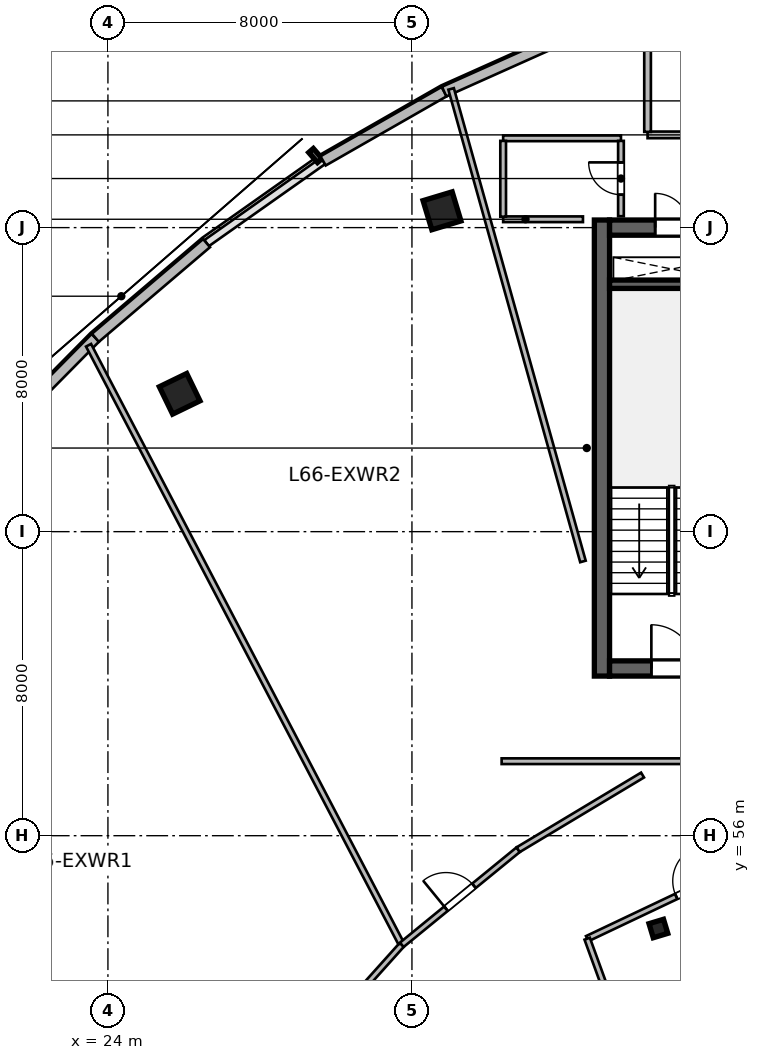
"""IFC4 building model, lengths in metres.
Left out: names, types, materials, properties, quantities, classifications, styles, units other than length and angle.
Written with IfcOpenShell. Run it as: python <this file> out.ifc"""

import sys

from ifc_helpers import new_model, si_unit, direction, frame, frame_2d, origin, origin_2d, place, context, subcontext, project, spatial, rectangle, i_section, extrude, source, transform, mapped, element, fill, save


model = new_model("IFC4")
c1 = context("Model", 3, precision=1e-05, world=origin(), true_north=direction((0.0, 1.0)))
c2 = subcontext(c1, "Body", "Model", "MODEL_VIEW")
j1 = project(units=[si_unit("LENGTHUNIT", "METRE"), si_unit("PLANEANGLEUNIT", "RADIAN")], contexts=[c1])
p1 = place(None, origin())
s1 = spatial("IfcSite", under=j1, at=p1, CompositionType="ELEMENT")
p2 = place(p1, origin())
s2 = spatial("IfcBuilding", under=s1, at=p2, CompositionType="ELEMENT")
p3 = place(p2, frame((0.0, 0.0, 271.8)))
s3 = spatial("IfcBuildingStorey", under=s2, at=p3, CompositionType="ELEMENT", Elevation=271.8)
m1 = source(origin(), c2, "Body", "SweptSolid", [
    extrude(rectangle(XDim=12.0, YDim=0.4, at=frame_2d((6.0, 0.0))), origin(), (0.0, 0.0, 1.0), 3.9),
])
p4 = place(p3, frame((37.0, 60.2, 0.0), z_axis=(0.0, 0.0, 1.0), x_axis=(0.0, 1.0, 0.0)))
e1 = element("IfcWall", 1, at=p4, inside=s3, PredefinedType="SHEAR", context=c2, shape_type="MappedRepresentation", body=[
    mapped(m1, transform((0.0, 0.0, 0.0), scale=1.0)),
])
m2 = source(origin(), c2, "Body", "SweptSolid", [
    extrude(rectangle(XDim=21.6, YDim=0.4, at=frame_2d((10.8, 0.0))), origin(), (0.0, 0.0, 1.0), 3.9),
])
p5 = place(p3, frame((37.2, 60.4, 0.0), z_axis=(0.0, 0.0, 1.0), x_axis=(1.0, 0.0, 0.0)))
e2 = element("IfcWall", 2, at=p5, inside=s3, PredefinedType="SHEAR", context=c2, shape_type="MappedRepresentation", body=[
    mapped(m2, transform((0.0, 0.0, 0.0), scale=1.0)),
])
p6 = place(p5, frame((1.1, 0.0, 0.0)))
e3 = element("IfcOpeningElement", 3, at=p6, cuts=e2, PredefinedType="OPENING", context=c2, shape_type="SweptSolid", body=[
    extrude(rectangle(XDim=1.15, YDim=2.15, at=frame_2d((0.575, 1.075))), frame((0.0, 0.21, 0.0), z_axis=(0.0, -1.0, 0.0), x_axis=(1.0, 0.0, 0.0)), (0.0, 0.0, 1.0), 0.42),
])
p7 = place(p5, frame((19.5, 0.0, 0.0)))
e4 = element("IfcOpeningElement", 4, at=p7, cuts=e2, PredefinedType="OPENING", context=c2, shape_type="SweptSolid", body=[
    extrude(rectangle(XDim=0.9, YDim=2.1, at=frame_2d((0.45, 1.05))), frame((0.0, 0.21, 0.0), z_axis=(0.0, -1.0, 0.0), x_axis=(1.0, 0.0, 0.0)), (0.0, 0.0, 1.0), 0.42),
])
p8 = place(p5, frame((12.02, 0.0, 0.0)))
e5 = element("IfcOpeningElement", 5, at=p8, cuts=e2, PredefinedType="OPENING", context=c2, shape_type="SweptSolid", body=[
    extrude(rectangle(XDim=1.6, YDim=2.15, at=frame_2d((0.8, 1.075))), frame((0.0, 0.21, 0.0), z_axis=(0.0, -1.0, 0.0), x_axis=(1.0, 0.0, 0.0)), (0.0, 0.0, 1.0), 0.42),
])
p9 = place(p3, frame((37.2, 72.0, 0.0), z_axis=(0.0, 0.0, 1.0), x_axis=(1.0, 0.0, 0.0)))
e6 = element("IfcWall", 6, at=p9, inside=s3, PredefinedType="SHEAR", context=c2, shape_type="MappedRepresentation", body=[
    mapped(m2, transform((0.0, 0.0, 0.0), scale=1.0)),
])
p10 = place(p9, frame((1.2, 0.0, 0.0)))
e7 = element("IfcOpeningElement", 7, at=p10, cuts=e6, PredefinedType="OPENING", context=c2, shape_type="SweptSolid", body=[
    extrude(rectangle(XDim=0.9, YDim=2.1, at=frame_2d((0.45, 1.05))), frame((0.0, 0.21, 0.0), z_axis=(0.0, -1.0, 0.0), x_axis=(1.0, 0.0, 0.0)), (0.0, 0.0, 1.0), 0.42),
])
p11 = place(p9, frame((14.7, 0.0, 0.0)))
e8 = element("IfcOpeningElement", 8, at=p11, cuts=e6, PredefinedType="OPENING", context=c2, shape_type="SweptSolid", body=[
    extrude(rectangle(XDim=1.2, YDim=2.15, at=frame_2d((0.6, 1.075))), frame((0.0, 0.21, 0.0), z_axis=(0.0, -1.0, 0.0), x_axis=(1.0, 0.0, 0.0)), (0.0, 0.0, 1.0), 0.42),
])
p12 = place(p9, frame((4.15, 0.0, 0.0)))
e9 = element("IfcOpeningElement", 9, at=p12, cuts=e6, PredefinedType="OPENING", context=c2, shape_type="SweptSolid", body=[
    extrude(rectangle(XDim=1.3, YDim=2.15, at=frame_2d((0.65, 1.075))), frame((0.0, 0.21, 0.0), z_axis=(0.0, -1.0, 0.0), x_axis=(1.0, 0.0, 0.0)), (0.0, 0.0, 1.0), 0.42),
])
p13 = place(p9, frame((6.76, 0.0, 0.0)))
e10 = element("IfcOpeningElement", 10, at=p13, cuts=e6, PredefinedType="OPENING", context=c2, shape_type="SweptSolid", body=[
    extrude(rectangle(XDim=0.85, YDim=2.1, at=frame_2d((0.425, 1.05))), frame((0.0, 0.21, 0.0), z_axis=(0.0, -1.0, 0.0), x_axis=(1.0, 0.0, 0.0)), (0.0, 0.0, 1.0), 0.42),
])
p14 = place(p9, frame((8.76, 0.0, 0.0)))
e11 = element("IfcOpeningElement", 11, at=p14, cuts=e6, PredefinedType="OPENING", context=c2, shape_type="SweptSolid", body=[
    extrude(rectangle(XDim=0.85, YDim=2.1, at=frame_2d((0.425, 1.05))), frame((0.0, 0.21, 0.0), z_axis=(0.0, -1.0, 0.0), x_axis=(1.0, 0.0, 0.0)), (0.0, 0.0, 1.0), 0.42),
])
p15 = place(p9, frame((10.725, 0.0, 0.0)))
e12 = element("IfcOpeningElement", 12, at=p15, cuts=e6, PredefinedType="OPENING", context=c2, shape_type="SweptSolid", body=[
    extrude(rectangle(XDim=0.85, YDim=2.1, at=frame_2d((0.425, 1.05))), frame((0.0, 0.21, 0.0), z_axis=(0.0, -1.0, 0.0), x_axis=(1.0, 0.0, 0.0)), (0.0, 0.0, 1.0), 0.42),
])
m3 = source(origin(), c2, "Body", "SweptSolid", [
    extrude(rectangle(XDim=3.27, YDim=0.22, at=frame_2d((1.635, 0.0))), origin(), (0.0, 0.0, 1.0), 3.9),
])
p16 = place(p3, frame((37.2, 70.51, 0.0), z_axis=(0.0, 0.0, 1.0), x_axis=(1.0, 0.0, 0.0)))
e13 = element("IfcWall", 13, at=p16, inside=s3, PredefinedType="SHEAR", context=c2, shape_type="MappedRepresentation", body=[
    mapped(m3, transform((0.0, 0.0, 0.0), scale=1.0)),
])
m4 = source(origin(), c2, "Body", "SweptSolid", [
    extrude(rectangle(XDim=0.8, YDim=0.8, at=origin_2d()), origin(), (0.0, 0.0, 1.0), 3.9),
])
p17 = place(p3, frame((25.888, 67.627, 0.0), z_axis=(0.0, 0.0, 1.0), x_axis=(-0.436173672171, 0.899862504889, 0.0)))
e14 = element("IfcColumn", 14, at=p17, inside=s3, PredefinedType="COLUMN", context=c2, shape_type="MappedRepresentation", body=[
    mapped(m4, transform((0.0, 0.0, 0.0), scale=1.0)),
])
m5 = source(origin(), c2, "Body", "SweptSolid", [
    extrude(i_section(OverallWidth=0.399, OverallDepth=0.387, WebThickness=0.021, FlangeThickness=0.033, at=origin_2d()), origin(), (0.0, 0.0, 1.0), 3.9),
])
p18 = place(p3, frame((38.485, 53.558, 0.0), z_axis=(0.0, 0.0, 1.0), x_axis=(-0.288697611798, 0.957420330337, 0.0)))
e15 = element("IfcColumn", 15, at=p18, inside=s3, PredefinedType="COLUMN", context=c2, shape_type="MappedRepresentation", body=[
    mapped(m5, transform((0.0, 0.0, 0.0), scale=1.0)),
])
p19 = place(p3, frame((32.791, 72.442, 0.0), z_axis=(0.0, 0.0, 1.0), x_axis=(-0.288697611798, 0.957420330337, 0.0)))
e16 = element("IfcColumn", 16, at=p19, inside=s3, PredefinedType="COLUMN", context=c2, shape_type="MappedRepresentation", body=[
    mapped(m4, transform((0.0, 0.0, 0.0), scale=1.0)),
])
m6 = source(origin(), c2, "Body", "SweptSolid", [
    extrude(rectangle(XDim=3.937, YDim=0.28, at=frame_2d((1.968, 0.0))), origin(), (0.0, 0.0, 1.0), 3.64),
])
p20 = place(p3, frame((20.903, 66.3, 0.0), z_axis=(0.0, 0.0, 1.0), x_axis=(0.702690019653, 0.711496125274, 0.0)))
e17 = element("IfcWall", 17, at=p20, inside=s3, PredefinedType="SOLIDWALL", context=c2, shape_type="MappedRepresentation", body=[
    mapped(m6, transform((0.0, 0.0, 0.0), scale=1.0)),
])
m7 = source(origin(), c2, "Body", "SweptSolid", [
    extrude(rectangle(XDim=3.843, YDim=0.28, at=frame_2d((1.921, 0.0))), origin(), (0.0, 0.0, 1.0), 3.64),
])
p21 = place(p3, frame((23.67, 69.101, 0.0), z_axis=(0.0, 0.0, 1.0), x_axis=(0.761508028279, 0.648155477387, 0.0)))
e18 = element("IfcWall", 18, at=p21, inside=s3, PredefinedType="SOLIDWALL", context=c2, shape_type="MappedRepresentation", body=[
    mapped(m7, transform((0.0, 0.0, 0.0), scale=1.0)),
])
m8 = source(origin(), c2, "Body", "SweptSolid", [
    extrude(rectangle(XDim=3.671, YDim=0.28, at=frame_2d((1.835, 0.0))), origin(), (0.0, 0.0, 1.0), 3.64),
])
p22 = place(p3, frame((29.662, 73.756, 0.0), z_axis=(0.0, 0.0, 1.0), x_axis=(0.867931917784, 0.496683184829, 0.0)))
e19 = element("IfcWall", 19, at=p22, inside=s3, PredefinedType="SOLIDWALL", context=c2, shape_type="MappedRepresentation", body=[
    mapped(m8, transform((0.0, 0.0, 0.0), scale=1.0)),
])
m9 = source(origin(), c2, "Body", "SweptSolid", [
    extrude(rectangle(XDim=3.599, YDim=0.28, at=frame_2d((1.799, 0.0))), origin(), (0.0, 0.0, 1.0), 3.64),
])
p23 = place(p3, frame((32.848, 75.579, 0.0), z_axis=(0.0, 0.0, 1.0), x_axis=(0.912714407797, 0.40859810303, 0.0)))
e20 = element("IfcWall", 20, at=p23, inside=s3, PredefinedType="SOLIDWALL", context=c2, shape_type="MappedRepresentation", body=[
    mapped(m9, transform((0.0, 0.0, 0.0), scale=1.0)),
])
m10 = source(origin(), c2, "Body", "SweptSolid", [
    extrude(rectangle(XDim=2.1, YDim=0.15, at=frame_2d((1.05, 0.0))), origin(), (0.0, 0.0, 1.0), 3.64),
])
p24 = place(p3, frame((34.4, 72.22, 0.0), z_axis=(0.0, 0.0, 1.0), x_axis=(1.0, 0.0, 0.0)))
e21 = element("IfcWall", 21, at=p24, inside=s3, PredefinedType="PARTITIONING", context=c2, shape_type="MappedRepresentation", body=[
    mapped(m10, transform((0.0, 0.0, 0.0), scale=1.0)),
])
m11 = source(origin(), c2, "Body", "SweptSolid", [
    extrude(rectangle(XDim=3.1, YDim=0.15, at=frame_2d((1.55, 0.0))), origin(), (0.0, 0.0, 1.0), 3.071),
])
p25 = place(p3, frame((34.4, 74.35, 0.0), z_axis=(0.0, 0.0, 1.0), x_axis=(1.0, 0.0, 0.0)))
e22 = element("IfcWall", 22, at=p25, inside=s3, PredefinedType="PARTITIONING", context=c2, shape_type="MappedRepresentation", body=[
    mapped(m11, transform((0.0, 0.0, 0.0), scale=1.0)),
])
m12 = source(origin(), c2, "Body", "SweptSolid", [
    extrude(rectangle(XDim=1.995, YDim=0.15, at=frame_2d((0.998, 0.0))), origin(), (0.0, 0.0, 1.0), 3.64),
])
p26 = place(p3, frame((34.4, 72.288, 0.0), z_axis=(0.0, 0.0, 1.0), x_axis=(0.0, 1.0, 0.0)))
e23 = element("IfcWall", 23, at=p26, inside=s3, PredefinedType="PARTITIONING", context=c2, shape_type="MappedRepresentation", body=[
    mapped(m12, transform((0.0, 0.0, 0.0), scale=1.0)),
])
m13 = source(origin(), c2, "Body", "SweptSolid", [
    extrude(rectangle(XDim=1.982, YDim=0.15, at=frame_2d((0.991, 0.0))), origin(), (0.0, 0.0, 1.0), 3.64),
])
p27 = place(p3, frame((37.5, 72.3, 0.0), z_axis=(0.0, 0.0, 1.0), x_axis=(0.0, 1.0, 0.0)))
e24 = element("IfcWall", 24, at=p27, inside=s3, PredefinedType="PARTITIONING", context=c2, shape_type="MappedRepresentation", body=[
    mapped(m13, transform((0.0, 0.0, 0.0), scale=1.0)),
])
p28 = place(p27, frame((0.566, 0.0, 0.0)))
e25 = element("IfcOpeningElement", 25, at=p28, cuts=e24, PredefinedType="OPENING", context=c2, shape_type="SweptSolid", body=[
    extrude(rectangle(XDim=0.85, YDim=2.1, at=frame_2d((0.425, 1.05))), frame((0.0, 0.085, 0.0), z_axis=(0.0, -1.0, 0.0), x_axis=(1.0, 0.0, 0.0)), (0.0, 0.0, 1.0), 0.17),
])
m14 = source(origin(), c2, "Body", "SweptSolid", [
    extrude(rectangle(XDim=4.0, YDim=0.175, at=frame_2d((2.0, 0.0))), origin(), (0.0, 0.0, 1.0), 3.64),
])
p29 = place(p3, frame((38.2, 74.44, 0.0), z_axis=(0.0, 0.0, 1.0), x_axis=(1.0, 0.0, 0.0)))
e26 = element("IfcWall", 26, at=p29, inside=s3, PredefinedType="PARTITIONING", context=c2, shape_type="MappedRepresentation", body=[
    mapped(m14, transform((0.0, 0.0, 0.0), scale=1.0)),
])
p30 = place(p29, frame((2.7, 0.0, 0.0)))
e27 = element("IfcOpeningElement", 27, at=p30, cuts=e26, PredefinedType="OPENING", context=c2, shape_type="SweptSolid", body=[
    extrude(rectangle(XDim=0.9, YDim=2.08, at=frame_2d((0.45, 1.04))), frame((0.0, 0.098, 0.0), z_axis=(0.0, -1.0, 0.0), x_axis=(1.0, 0.0, 0.0)), (0.0, 0.0, 1.0), 0.195),
])
m15 = source(origin(), c2, "Body", "SweptSolid", [
    extrude(rectangle(XDim=2.403, YDim=0.175, at=frame_2d((1.201, 0.0))), origin(), (0.0, 0.0, 1.0), 3.64),
])
p31 = place(p3, frame((38.2, 74.519, 0.0), z_axis=(0.0, 0.0, 1.0), x_axis=(0.0, 1.0, 0.0)))
e28 = element("IfcWall", 28, at=p31, inside=s3, PredefinedType="PARTITIONING", context=c2, shape_type="MappedRepresentation", body=[
    mapped(m15, transform((0.0, 0.0, 0.0), scale=1.0)),
])
m16 = source(origin(), c2, "Body", "SweptSolid", [
    extrude(rectangle(XDim=6.137, YDim=0.15, at=frame_2d((3.069, 0.0))), origin(), (0.0, 0.0, 1.0), 3.64),
])
p32 = place(p3, frame((36.611, 53.29, 0.0), z_axis=(0.0, 0.0, 1.0), x_axis=(0.903442784804, 0.428708682657, 0.0)))
e29 = element("IfcWall", 29, at=p32, inside=s3, PredefinedType="PARTITIONING", context=c2, shape_type="MappedRepresentation", body=[
    mapped(m16, transform((0.0, 0.0, 0.0), scale=1.0)),
])
p33 = place(p32, frame((2.594, 0.0, 0.0)))
e30 = element("IfcOpeningElement", 30, at=p33, cuts=e29, PredefinedType="OPENING", context=c2, shape_type="SweptSolid", body=[
    extrude(rectangle(XDim=0.95, YDim=2.1, at=frame_2d((0.475, 1.05))), frame((0.0, 0.085, 0.0), z_axis=(0.0, -1.0, 0.0), x_axis=(1.0, 0.0, 0.0)), (0.0, 0.0, 1.0), 0.17),
])
m17 = source(origin(), c2, "Body", "SweptSolid", [
    extrude(rectangle(XDim=3.505, YDim=0.15, at=frame_2d((1.752, 0.0))), origin(), (0.0, 0.0, 1.0), 3.64),
])
p34 = place(p3, frame((37.81, 49.997, 0.0), z_axis=(0.0, 0.0, 1.0), x_axis=(-0.342045087719, 0.939683541394, 0.0)))
e31 = element("IfcWall", 31, at=p34, inside=s3, PredefinedType="PARTITIONING", context=c2, shape_type="MappedRepresentation", body=[
    mapped(m17, transform((0.0, 0.0, 0.0), scale=1.0)),
])
m18 = source(origin(), c2, "Body", "SweptSolid", [
    extrude(rectangle(XDim=5.407, YDim=0.15, at=frame_2d((2.704, 0.0))), origin(), (0.0, 0.0, 1.0), 3.64),
])
p35 = place(p3, frame((28.122, 49.105, 0.0), z_axis=(0.0, 0.0, 1.0), x_axis=(0.667851383423, 0.744294652447, 0.0)))
e32 = element("IfcWall", 32, at=p35, inside=s3, PredefinedType="PARTITIONING", context=c2, shape_type="MappedRepresentation", body=[
    mapped(m18, transform((0.0, 0.0, 0.0), scale=1.0)),
])
m19 = source(origin(), c2, "Body", "SweptSolid", [
    extrude(rectangle(XDim=16.154, YDim=0.15, at=frame_2d((8.077, 0.0))), origin(), (0.0, 0.0, 1.0), 3.64),
])
p36 = place(p3, frame((25.024, 44.369, 0.0), z_axis=(0.0, 0.0, 1.0), x_axis=(-0.716519492877, 0.697567069412, 0.0)))
e33 = element("IfcWall", 33, at=p36, inside=s3, PredefinedType="PARTITIONING", context=c2, shape_type="MappedRepresentation", body=[
    mapped(m19, transform((0.0, 0.0, 0.0), scale=1.0)),
])
m20 = source(origin(), c2, "Body", "SweptSolid", [
    extrude(rectangle(XDim=17.75, YDim=0.15, at=frame_2d((8.875, 0.0))), origin(), (0.0, 0.0, 1.0), 3.64),
])
p37 = place(p3, frame((31.71, 53.174, 0.0), z_axis=(0.0, 0.0, 1.0), x_axis=(-0.463130463827, 0.886290118119, 0.0)))
e34 = element("IfcWall", 34, at=p37, inside=s3, PredefinedType="PARTITIONING", context=c2, shape_type="MappedRepresentation", body=[
    mapped(m20, transform((0.0, 0.0, 0.0), scale=1.0)),
])
m21 = source(origin(), c2, "Body", "SweptSolid", [
    extrude(rectangle(XDim=3.954, YDim=0.15, at=frame_2d((1.977, 0.0))), origin(), (0.0, 0.0, 1.0), 3.64),
])
p38 = place(p3, frame((31.733, 53.13, 0.0), z_axis=(0.0, 0.0, 1.0), x_axis=(0.774345047596, 0.632763579281, 0.0)))
e35 = element("IfcWall", 35, at=p38, inside=s3, PredefinedType="PARTITIONING", context=c2, shape_type="MappedRepresentation", body=[
    mapped(m21, transform((0.0, 0.0, 0.0), scale=1.0)),
])
p39 = place(p38, frame((1.502, 0.0, 0.0)))
e36 = element("IfcOpeningElement", 36, at=p39, cuts=e35, PredefinedType="OPENING", context=c2, shape_type="SweptSolid", body=[
    extrude(rectangle(XDim=0.95, YDim=2.1, at=frame_2d((0.475, 1.05))), frame((0.0, 0.085, 0.0), z_axis=(0.0, -1.0, 0.0), x_axis=(1.0, 0.0, 0.0)), (0.0, 0.0, 1.0), 0.17),
])
m22 = source(origin(), c2, "Body", "SweptSolid", [
    extrude(rectangle(XDim=3.817, YDim=0.15, at=frame_2d((1.909, 0.0))), origin(), (0.0, 0.0, 1.0), 3.64),
])
p40 = place(p3, frame((34.795, 55.632, 0.0), z_axis=(0.0, 0.0, 1.0), x_axis=(0.857453418218, 0.514561595522, 0.0)))
e37 = element("IfcWall", 37, at=p40, inside=s3, PredefinedType="PARTITIONING", context=c2, shape_type="MappedRepresentation", body=[
    mapped(m22, transform((0.0, 0.0, 0.0), scale=1.0)),
])
m23 = source(origin(), c2, "Body", "SweptSolid", [
    extrude(rectangle(XDim=12.909, YDim=0.15, at=frame_2d((6.454, 0.0))), origin(), (0.0, 0.0, 1.0), 3.64),
])
p41 = place(p3, frame((36.5, 63.216, 0.0), z_axis=(0.0, 0.0, 1.0), x_axis=(-0.268750817191, 0.963209737419, 0.0)))
e38 = element("IfcWall", 38, at=p41, inside=s3, PredefinedType="PARTITIONING", context=c2, shape_type="MappedRepresentation", body=[
    mapped(m23, transform((0.0, 0.0, 0.0), scale=1.0)),
])
m24 = source(origin(), c2, "Body", "SweptSolid", [
    extrude(rectangle(XDim=12.39, YDim=0.15, at=frame_2d((6.195, 0.0))), origin(), (0.0, 0.0, 1.0), 3.373),
])
p42 = place(p3, frame((34.36, 57.96, 0.0), z_axis=(0.0, 0.0, 1.0), x_axis=(1.0, 0.0, 0.0)))
e39 = element("IfcWall", 39, at=p42, inside=s3, PredefinedType="PARTITIONING", context=c2, shape_type="MappedRepresentation", body=[
    mapped(m24, transform((0.0, 0.0, 0.0), scale=1.0)),
])
m25 = source(origin(), c2, "Body", "SweptSolid", [
    extrude(rectangle(XDim=1.15, YDim=2.15, at=frame_2d((0.575, 1.075))), frame((0.0, 0.025, 0.0), z_axis=(0.0, -1.0, 0.0), x_axis=(1.0, 0.0, 0.0)), (0.0, 0.0, 1.0), 0.05),
])
p43 = place(p6, origin())
e40 = element("IfcDoor", 40, at=p43, inside=s3, OperationType="SINGLE_SWING_LEFT", PredefinedType="DOOR", context=c2, shape_type="MappedRepresentation", body=[
    mapped(m25, transform((0.0, 0.0, 0.0), scale=1.0)),
])
fill(e3, e40)
m26 = source(origin(), c2, "Body", "SweptSolid", [
    extrude(rectangle(XDim=0.9, YDim=2.1, at=frame_2d((0.45, 1.05))), frame((0.0, 0.025, 0.0), z_axis=(0.0, -1.0, 0.0), x_axis=(1.0, 0.0, 0.0)), (0.0, 0.0, 1.0), 0.05),
])
p44 = place(p10, origin())
e41 = element("IfcDoor", 41, at=p44, inside=s3, OperationType="SINGLE_SWING_LEFT", PredefinedType="DOOR", context=c2, shape_type="MappedRepresentation", body=[
    mapped(m26, transform((0.0, 0.0, 0.0), scale=1.0)),
])
fill(e7, e41)
m27 = source(origin(), c2, "Body", "SweptSolid", [
    extrude(rectangle(XDim=0.85, YDim=2.1, at=frame_2d((0.425, 1.05))), frame((0.0, 0.025, 0.0), z_axis=(0.0, -1.0, 0.0), x_axis=(1.0, 0.0, 0.0)), (0.0, 0.0, 1.0), 0.05),
])
p45 = place(p28, origin())
e42 = element("IfcDoor", 42, at=p45, inside=s3, OperationType="SINGLE_SWING_RIGHT", PredefinedType="DOOR", context=c2, shape_type="MappedRepresentation", body=[
    mapped(m27, transform((0.0, 0.0, 0.0), scale=1.0)),
])
fill(e25, e42)
m28 = source(origin(), c2, "Body", "SweptSolid", [
    extrude(rectangle(XDim=0.95, YDim=2.1, at=frame_2d((0.475, 1.05))), frame((0.0, 0.025, 0.0), z_axis=(0.0, -1.0, 0.0), x_axis=(1.0, 0.0, 0.0)), (0.0, 0.0, 1.0), 0.05),
])
p46 = place(p33, origin())
e43 = element("IfcDoor", 43, at=p46, inside=s3, OperationType="SINGLE_SWING_RIGHT", PredefinedType="DOOR", context=c2, shape_type="MappedRepresentation", body=[
    mapped(m28, transform((0.0, 0.0, 0.0), scale=1.0)),
])
fill(e30, e43)
p47 = place(p39, origin())
e44 = element("IfcDoor", 44, at=p47, inside=s3, OperationType="SINGLE_SWING_LEFT", PredefinedType="DOOR", context=c2, shape_type="MappedRepresentation", body=[
    mapped(m28, transform((0.0, 0.0, 0.0), scale=1.0)),
])
fill(e36, e44)
save(model, sys.argv[1])
